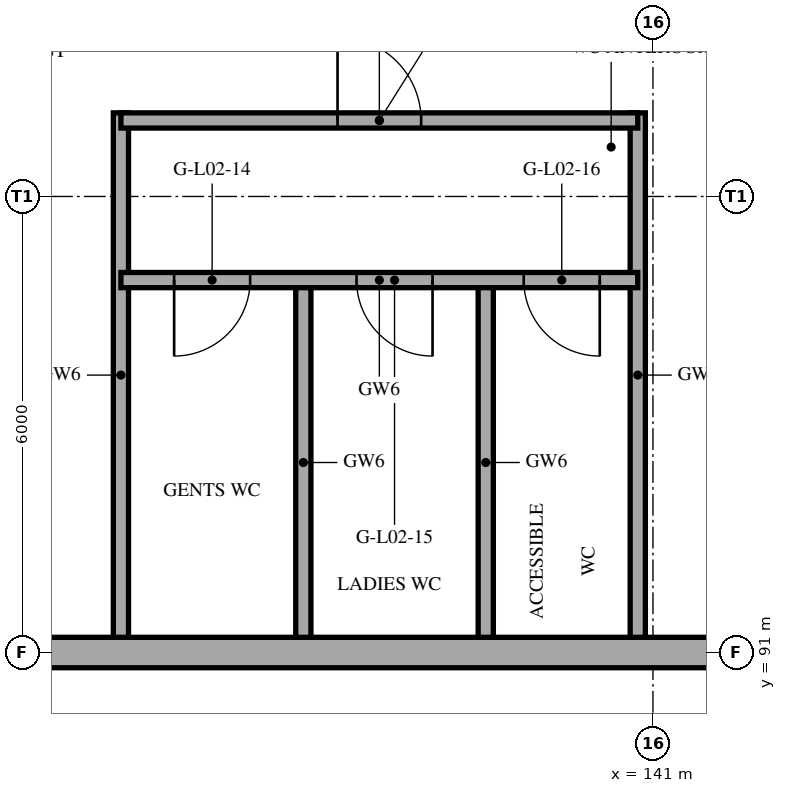
"""IFC4 building model, lengths in metres.
Left out: names, types, materials, properties, quantities, classifications, styles, units other than length and angle.
Written with IfcOpenShell. Run it as: python <this file> out.ifc"""

import sys

from ifc_helpers import new_model, si_unit, direction, frame, frame_2d, origin, place, context, subcontext, project, spatial, rectangle, extrude, element, fill, save


model = new_model("IFC4")
c1 = context("Model", 3, precision=1e-05, world=origin(), true_north=direction((0.0, 1.0)))
c2 = subcontext(c1, "Body", "Model", "MODEL_VIEW")
j1 = project(units=[si_unit("LENGTHUNIT", "METRE"), si_unit("PLANEANGLEUNIT", "RADIAN")], contexts=[c1])
p1 = place(None, origin())
s1 = spatial("IfcSite", under=j1, at=p1, CompositionType="ELEMENT")
p2 = place(p1, origin())
s2 = spatial("IfcBuilding", under=s1, at=p2, CompositionType="ELEMENT")
p3 = place(p2, frame((0.0, 0.0, 10.0)))
s3 = spatial("IfcBuildingStorey", under=s2, at=p3, CompositionType="ELEMENT", Elevation=10.0)
p4 = place(p3, frame((107.6, 91.0, 0.0), z_axis=(0.0, 0.0, 1.0), x_axis=(1.0, 0.0, 0.0)))
e1 = element("IfcWall", 1, at=p4, inside=s3, PredefinedType="SHEAR", context=c2, shape_type="SweptSolid", body=[
    extrude(rectangle(XDim=41.6, YDim=0.4, at=frame_2d((20.8, 0.0))), origin(), (0.0, 0.0, 1.0), 5.0),
])
p5 = place(p4, frame((9.9, 0.0, 1.0)))
e2 = element("IfcOpeningElement", 2, at=p5, cuts=e1, PredefinedType="OPENING", context=c2, shape_type="SweptSolid", body=[
    extrude(rectangle(XDim=2.0, YDim=1.2, at=frame_2d((1.0, 0.6))), frame((0.0, 0.21, 0.0), z_axis=(0.0, -1.0, 0.0), x_axis=(1.0, 0.0, 0.0)), (0.0, 0.0, 1.0), 0.42),
])
p6 = place(p4, frame((13.1, 0.0, 1.0)))
e3 = element("IfcOpeningElement", 3, at=p6, cuts=e1, PredefinedType="OPENING", context=c2, shape_type="SweptSolid", body=[
    extrude(rectangle(XDim=2.0, YDim=1.2, at=frame_2d((1.0, 0.6))), frame((0.0, 0.21, 0.0), z_axis=(0.0, -1.0, 0.0), x_axis=(1.0, 0.0, 0.0)), (0.0, 0.0, 1.0), 0.42),
])
p7 = place(p4, frame((2.5, 0.0, 0.0)))
e4 = element("IfcOpeningElement", 4, at=p7, cuts=e1, PredefinedType="OPENING", context=c2, shape_type="SweptSolid", body=[
    extrude(rectangle(XDim=1.8, YDim=2.1, at=frame_2d((0.9, 1.05))), frame((0.0, 0.21, 0.0), z_axis=(0.0, -1.0, 0.0), x_axis=(1.0, 0.0, 0.0)), (0.0, 0.0, 1.0), 0.42),
])
p8 = place(p4, frame((37.5, 0.0, 0.0)))
e5 = element("IfcOpeningElement", 5, at=p8, cuts=e1, PredefinedType="OPENING", context=c2, shape_type="SweptSolid", body=[
    extrude(rectangle(XDim=1.8, YDim=2.1, at=frame_2d((0.9, 1.05))), frame((0.0, 0.21, 0.0), z_axis=(0.0, -1.0, 0.0), x_axis=(1.0, 0.0, 0.0)), (0.0, 0.0, 1.0), 0.42),
])
for number, where, z_axis, x_axis in (
    (6, (134.0, 91.2, 0.0), (0.0, 0.0, 1.0), (0.0, 1.0, 0.0)),
    (7, (140.8, 91.2, 0.0), (0.0, 0.0, 1.0), (0.0, 1.0, 0.0)),
):
    element("IfcWall", number, at=place(p3, frame(where, z_axis=z_axis, x_axis=x_axis)), inside=s3, PredefinedType="PARTITIONING", context=c2, shape_type="SweptSolid", body=[
        extrude(rectangle(XDim=6.9, YDim=0.2, at=frame_2d((3.45, 0.0))), origin(), (0.0, 0.0, 1.0), 4.6),
    ])
p9 = place(p3, frame((134.0, 98.0, 0.0), z_axis=(0.0, 0.0, 1.0), x_axis=(1.0, 0.0, 0.0)))
e8 = element("IfcWall", 8, at=p9, inside=s3, PredefinedType="PARTITIONING", context=c2, shape_type="SweptSolid", body=[
    extrude(rectangle(XDim=6.8, YDim=0.2, at=frame_2d((3.4, 0.0))), origin(), (0.0, 0.0, 1.0), 4.6),
])
p10 = place(p9, frame((2.85, 0.0, 0.0)))
e9 = element("IfcOpeningElement", 9, at=p10, cuts=e8, PredefinedType="OPENING", context=c2, shape_type="SweptSolid", body=[
    extrude(rectangle(XDim=1.1, YDim=2.1, at=frame_2d((0.55, 1.05))), frame((0.0, 0.11, 0.0), z_axis=(0.0, -1.0, 0.0), x_axis=(1.0, 0.0, 0.0)), (0.0, 0.0, 1.0), 0.22),
])
p11 = place(p3, frame((134.0, 95.9, 0.0), z_axis=(0.0, 0.0, 1.0), x_axis=(1.0, 0.0, 0.0)))
e10 = element("IfcWall", 10, at=p11, inside=s3, PredefinedType="PARTITIONING", context=c2, shape_type="SweptSolid", body=[
    extrude(rectangle(XDim=6.8, YDim=0.2, at=frame_2d((3.4, 0.0))), origin(), (0.0, 0.0, 1.0), 4.6),
])
p12 = place(p11, frame((0.7, 0.0, 0.0)))
e11 = element("IfcOpeningElement", 11, at=p12, cuts=e10, PredefinedType="OPENING", context=c2, shape_type="SweptSolid", body=[
    extrude(rectangle(XDim=1.0, YDim=2.1, at=frame_2d((0.5, 1.05))), frame((0.0, 0.11, 0.0), z_axis=(0.0, -1.0, 0.0), x_axis=(1.0, 0.0, 0.0)), (0.0, 0.0, 1.0), 0.22),
])
p13 = place(p11, frame((3.1, 0.0, 0.0)))
e12 = element("IfcOpeningElement", 12, at=p13, cuts=e10, PredefinedType="OPENING", context=c2, shape_type="SweptSolid", body=[
    extrude(rectangle(XDim=1.0, YDim=2.1, at=frame_2d((0.5, 1.05))), frame((0.0, 0.11, 0.0), z_axis=(0.0, -1.0, 0.0), x_axis=(1.0, 0.0, 0.0)), (0.0, 0.0, 1.0), 0.22),
])
p14 = place(p11, frame((5.3, 0.0, 0.0)))
e13 = element("IfcOpeningElement", 13, at=p14, cuts=e10, PredefinedType="OPENING", context=c2, shape_type="SweptSolid", body=[
    extrude(rectangle(XDim=1.0, YDim=2.1, at=frame_2d((0.5, 1.05))), frame((0.0, 0.11, 0.0), z_axis=(0.0, -1.0, 0.0), x_axis=(1.0, 0.0, 0.0)), (0.0, 0.0, 1.0), 0.22),
])
for number, where, z_axis, x_axis in (
    (14, (136.4, 91.2, 0.0), (0.0, 0.0, 1.0), (0.0, 1.0, 0.0)),
    (15, (138.8, 91.2, 0.0), (0.0, 0.0, 1.0), (0.0, 1.0, 0.0)),
):
    element("IfcWall", number, at=place(p3, frame(where, z_axis=z_axis, x_axis=x_axis)), inside=s3, PredefinedType="PARTITIONING", context=c2, shape_type="SweptSolid", body=[
        extrude(rectangle(XDim=4.6, YDim=0.2, at=frame_2d((2.3, 0.0))), origin(), (0.0, 0.0, 1.0), 4.6),
    ])
p15 = place(p10, origin())
e16 = element("IfcDoor", 16, at=p15, inside=s3, OperationType="SINGLE_SWING_LEFT", PredefinedType="DOOR", context=c2, shape_type="SweptSolid", body=[
    extrude(rectangle(XDim=1.1, YDim=2.1, at=frame_2d((0.55, 1.05))), frame((0.0, 0.025, 0.0), z_axis=(0.0, -1.0, 0.0), x_axis=(1.0, 0.0, 0.0)), (0.0, 0.0, 1.0), 0.05),
])
fill(e9, e16)
p16 = place(p12, frame((1.0, 0.0, 0.0), z_axis=(0.0, 0.0, 1.0), x_axis=(-1.0, 0.0, 0.0)))
e17 = element("IfcDoor", 17, at=p16, inside=s3, OperationType="SINGLE_SWING_RIGHT", PredefinedType="DOOR", context=c2, shape_type="SweptSolid", body=[
    extrude(rectangle(XDim=1.0, YDim=2.1, at=frame_2d((0.5, 1.05))), frame((0.0, 0.025, 0.0), z_axis=(0.0, -1.0, 0.0), x_axis=(1.0, 0.0, 0.0)), (0.0, 0.0, 1.0), 0.05),
])
fill(e11, e17)
p17 = place(p13, frame((1.0, 0.0, 0.0), z_axis=(0.0, 0.0, 1.0), x_axis=(-1.0, 0.0, 0.0)))
e18 = element("IfcDoor", 18, at=p17, inside=s3, OperationType="SINGLE_SWING_LEFT", PredefinedType="DOOR", context=c2, shape_type="SweptSolid", body=[
    extrude(rectangle(XDim=1.0, YDim=2.1, at=frame_2d((0.5, 1.05))), frame((0.0, 0.025, 0.0), z_axis=(0.0, -1.0, 0.0), x_axis=(1.0, 0.0, 0.0)), (0.0, 0.0, 1.0), 0.05),
])
fill(e12, e18)
p18 = place(p14, frame((1.0, 0.0, 0.0), z_axis=(0.0, 0.0, 1.0), x_axis=(-1.0, 0.0, 0.0)))
e19 = element("IfcDoor", 19, at=p18, inside=s3, OperationType="SINGLE_SWING_LEFT", PredefinedType="DOOR", context=c2, shape_type="SweptSolid", body=[
    extrude(rectangle(XDim=1.0, YDim=2.1, at=frame_2d((0.5, 1.05))), frame((0.0, 0.025, 0.0), z_axis=(0.0, -1.0, 0.0), x_axis=(1.0, 0.0, 0.0)), (0.0, 0.0, 1.0), 0.05),
])
fill(e13, e19)
save(model, sys.argv[1])
